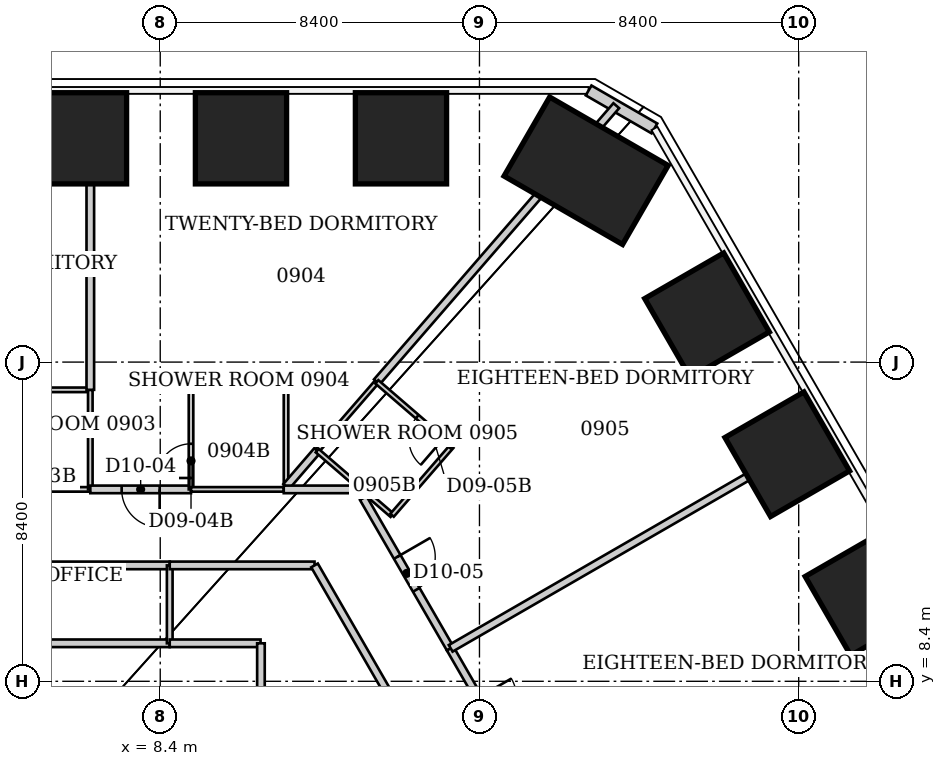
"""IFC4 building model, lengths in metres.
Left out: names, types, materials, properties, quantities, classifications, styles, units other than length and angle.
Written with IfcOpenShell. Run it as: python <this file> out.ifc"""

import sys

from ifc_helpers import new_model, si_unit, direction, frame, frame_2d, origin, origin_2d, place, context, subcontext, project, spatial, rectangle, extrude, element, fill, save


model = new_model("IFC4")
c1 = context("Model", 3, precision=1e-05, world=origin(), true_north=direction((0.0, 1.0)))
c2 = subcontext(c1, "Body", "Model", "MODEL_VIEW")
j1 = project(units=[si_unit("LENGTHUNIT", "METRE"), si_unit("PLANEANGLEUNIT", "RADIAN")], contexts=[c1])
p1 = place(None, origin())
s1 = spatial("IfcSite", under=j1, at=p1, CompositionType="ELEMENT")
p2 = place(p1, origin())
s2 = spatial("IfcBuilding", under=s1, at=p2, CompositionType="ELEMENT")
p3 = place(p2, frame((0.0, 0.0, 42.0)))
s3 = spatial("IfcBuildingStorey", under=s2, at=p3, CompositionType="ELEMENT", Elevation=42.0)
for number, where, z_axis, x_axis in (
    (1, (6.315, 22.689, 0.0), (0.0, 0.0, 1.0), (0.0, 1.0, 0.0)),
    (2, (10.525, 22.689, 0.0), (0.0, 0.0, 1.0), (0.0, 1.0, 0.0)),
    (3, (14.735, 22.689, 0.0), (0.0, 0.0, 1.0), (0.0, 1.0, 0.0)),
):
    element("IfcColumn", number, at=place(p3, frame(where, z_axis=z_axis, x_axis=x_axis)), inside=s3, PredefinedType="COLUMN", context=c2, shape_type="SweptSolid", body=[
        extrude(rectangle(XDim=2.4, YDim=2.4, at=origin_2d()), origin(), (0.0, 0.0, 1.0), 3.8),
    ])
p4 = place(p3, frame((19.606, 21.835, 0.0), z_axis=(0.0, 0.0, 1.0), x_axis=(0.5, 0.866025403784, 0.0)))
e4 = element("IfcColumn", 4, at=p4, inside=s3, PredefinedType="COLUMN", context=c2, shape_type="SweptSolid", body=[
    extrude(rectangle(XDim=2.4, YDim=3.6, at=origin_2d()), origin(), (0.0, 0.0, 1.0), 3.8),
])
for number, where, z_axis, x_axis in (
    (5, (22.788, 18.032, 0.0), (0.0, 0.0, 1.0), (0.866, 0.5, 0.0)),
    (6, (24.899, 14.375, 0.0), (0.0, 0.0, 1.0), (0.866, 0.5, 0.0)),
    (7, (27.01, 10.719, 0.0), (0.0, 0.0, 1.0), (0.866, 0.5, 0.0)),
):
    element("IfcColumn", number, at=place(p3, frame(where, z_axis=z_axis, x_axis=x_axis)), inside=s3, PredefinedType="COLUMN", context=c2, shape_type="SweptSolid", body=[
        extrude(rectangle(XDim=2.4, YDim=2.4, at=origin_2d()), origin(), (0.0, 0.0, 1.0), 3.8),
    ])
p5 = place(p3, frame((19.672, 23.949, 0.0), z_axis=(0.0, 0.0, 1.0), x_axis=(0.866010750942, -0.50002537861, 0.0)))
e8 = element("IfcWall", 8, at=p5, inside=s3, PredefinedType="SOLIDWALL", context=c2, shape_type="SweptSolid", body=[
    extrude(rectangle(XDim=2.0, YDim=0.3, at=frame_2d((1.0, 0.0))), origin(), (0.0, 0.0, 1.0), 3.64),
])
p6 = place(p3, frame((0.0, 11.45, 0.0), z_axis=(0.0, 0.0, 1.0), x_axis=(1.0, 0.0, 0.0)))
e9 = element("IfcWall", 9, at=p6, inside=s3, PredefinedType="PARTITIONING", context=c2, shape_type="SweptSolid", body=[
    extrude(rectangle(XDim=8.65, YDim=0.2, at=frame_2d((4.325, 0.0))), origin(), (0.0, 0.0, 1.0), 3.64),
])
p7 = place(p6, frame((3.775, 0.0, 0.0)))
e10 = element("IfcOpeningElement", 10, at=p7, cuts=e9, PredefinedType="OPENING", context=c2, shape_type="SweptSolid", body=[
    extrude(rectangle(XDim=1.1, YDim=2.2, at=frame_2d((0.55, 1.1))), frame((0.0, 0.1, 0.0), z_axis=(0.0, -1.0, 0.0), x_axis=(1.0, 0.0, 0.0)), (0.0, 0.0, 1.0), 0.2),
])
for number, where, z_axis, x_axis in (
    (11, (6.56, 13.45, 0.0), (0.0, 0.0, 1.0), (-1.0, 0.0, 0.0)),
    (12, (6.56, 16.07, 0.0), (0.0, 0.0, 1.0), (-1.0, 0.0, 0.0)),
):
    element("IfcWall", number, at=place(p3, frame(where, z_axis=z_axis, x_axis=x_axis)), inside=s3, PredefinedType="PARTITIONING", context=c2, shape_type="SweptSolid", body=[
        extrude(rectangle(XDim=2.4, YDim=0.12, at=frame_2d((1.2, 0.0))), origin(), (0.0, 0.0, 1.0), 3.64),
    ])
p8 = place(p3, frame((6.56, 16.07, 0.0), z_axis=(0.0, 0.0, 1.0), x_axis=(0.0, -1.0, 0.0)))
e13 = element("IfcWall", 13, at=p8, inside=s3, PredefinedType="PARTITIONING", context=c2, shape_type="SweptSolid", body=[
    extrude(rectangle(XDim=2.62, YDim=0.12, at=frame_2d((1.31, 0.0))), origin(), (0.0, 0.0, 1.0), 3.64),
])
p9 = place(p3, frame((6.56, 23.83, 0.0), z_axis=(0.0, 0.0, 1.0), x_axis=(0.0, -1.0, 0.0)))
e14 = element("IfcWall", 14, at=p9, inside=s3, PredefinedType="PARTITIONING", context=c2, shape_type="SweptSolid", body=[
    extrude(rectangle(XDim=7.76, YDim=0.2, at=frame_2d((3.88, 0.0))), origin(), (0.0, 0.0, 1.0), 3.64),
])
p10 = place(p3, frame((8.65, 9.4, 0.0), z_axis=(0.0, 0.0, 1.0), x_axis=(-1.0, 0.0, 0.0)))
e15 = element("IfcWall", 15, at=p10, inside=s3, PredefinedType="PARTITIONING", context=c2, shape_type="SweptSolid", body=[
    extrude(rectangle(XDim=8.65, YDim=0.2, at=frame_2d((4.325, 0.0))), origin(), (0.0, 0.0, 1.0), 3.64),
])
p11 = place(p3, frame((8.65, 11.45, 0.0), z_axis=(0.0, 0.0, 1.0), x_axis=(0.0, -1.0, 0.0)))
e16 = element("IfcWall", 16, at=p11, inside=s3, PredefinedType="PARTITIONING", context=c2, shape_type="SweptSolid", body=[
    extrude(rectangle(XDim=2.05, YDim=0.15, at=frame_2d((1.025, 0.0))), origin(), (0.0, 0.0, 1.0), 3.64),
])
p12 = place(p3, frame((8.65, 11.45, 0.0), z_axis=(0.0, 0.0, 1.0), x_axis=(1.0, 0.0, 0.0)))
e17 = element("IfcWall", 17, at=p12, inside=s3, PredefinedType="PARTITIONING", context=c2, shape_type="SweptSolid", body=[
    extrude(rectangle(XDim=3.81, YDim=0.2, at=frame_2d((1.905, 0.0))), origin(), (0.0, 0.0, 1.0), 3.64),
])
p13 = place(p3, frame((9.21, 13.45, 0.0), z_axis=(0.0, 0.0, 1.0), x_axis=(-1.0, 0.0, 0.0)))
e18 = element("IfcWall", 18, at=p13, inside=s3, PredefinedType="PARTITIONING", context=c2, shape_type="SweptSolid", body=[
    extrude(rectangle(XDim=2.65, YDim=0.2, at=frame_2d((1.325, 0.0))), origin(), (0.0, 0.0, 1.0), 3.64),
])
p14 = place(p13, frame((0.825, 0.0, 0.0)))
e19 = element("IfcOpeningElement", 19, at=p14, cuts=e18, PredefinedType="OPENING", context=c2, shape_type="SweptSolid", body=[
    extrude(rectangle(XDim=1.0, YDim=2.13, at=frame_2d((0.5, 1.065))), frame((0.0, 0.1, 0.0), z_axis=(0.0, -1.0, 0.0), x_axis=(1.0, 0.0, 0.0)), (0.0, 0.0, 1.0), 0.2),
])
p15 = place(p3, frame((9.21, 16.12, 0.0), z_axis=(0.0, 0.0, 1.0), x_axis=(0.0, -1.0, 0.0)))
e20 = element("IfcWall", 20, at=p15, inside=s3, PredefinedType="PARTITIONING", context=c2, shape_type="SweptSolid", body=[
    extrude(rectangle(XDim=2.67, YDim=0.12, at=frame_2d((1.335, 0.0))), origin(), (0.0, 0.0, 1.0), 3.64),
])
p16 = place(p15, frame((1.47, 0.0, 0.0)))
e21 = element("IfcOpeningElement", 21, at=p16, cuts=e20, PredefinedType="OPENING", context=c2, shape_type="SweptSolid", body=[
    extrude(rectangle(XDim=0.9, YDim=2.03, at=frame_2d((0.45, 1.015))), frame((0.0, 0.06, 0.0), z_axis=(0.0, -1.0, 0.0), x_axis=(1.0, 0.0, 0.0)), (0.0, 0.0, 1.0), 0.12),
])
p17 = place(p3, frame((11.04, 9.4, 0.0), z_axis=(0.0, 0.0, 1.0), x_axis=(-1.0, 0.0, 0.0)))
e22 = element("IfcWall", 22, at=p17, inside=s3, PredefinedType="PARTITIONING", context=c2, shape_type="SweptSolid", body=[
    extrude(rectangle(XDim=2.39, YDim=0.2, at=frame_2d((1.195, 0.0))), origin(), (0.0, 0.0, 1.0), 3.64),
])
p18 = place(p3, frame((11.05, -7.76, 0.0), z_axis=(0.0, 0.0, 1.0), x_axis=(0.0, 1.0, 0.0)))
e23 = element("IfcWall", 23, at=p18, inside=s3, PredefinedType="PARTITIONING", context=c2, shape_type="SweptSolid", body=[
    extrude(rectangle(XDim=17.16, YDim=0.2, at=frame_2d((8.58, 0.0))), origin(), (0.0, 0.0, 1.0), 3.64),
])
p19 = place(p18, frame((8.03, 0.0, 0.0)))
e24 = element("IfcOpeningElement", 24, at=p19, cuts=e23, PredefinedType="OPENING", context=c2, shape_type="SweptSolid", body=[
    extrude(rectangle(XDim=1.1, YDim=2.2, at=frame_2d((0.55, 1.1))), frame((0.0, 0.1, 0.0), z_axis=(0.0, -1.0, 0.0), x_axis=(1.0, 0.0, 0.0)), (0.0, 0.0, 1.0), 0.2),
])
p20 = place(p3, frame((11.65, 13.45, 0.0), z_axis=(0.0, 0.0, 1.0), x_axis=(-1.0, 0.0, 0.0)))
e25 = element("IfcWall", 25, at=p20, inside=s3, PredefinedType="PARTITIONING", context=c2, shape_type="SweptSolid", body=[
    extrude(rectangle(XDim=2.44, YDim=0.12, at=frame_2d((1.22, 0.0))), origin(), (0.0, 0.0, 1.0), 3.64),
])
p21 = place(p3, frame((11.71, 13.605, 0.0), z_axis=(0.0, 0.0, 1.0), x_axis=(0.0, 1.0, 0.0)))
e26 = element("IfcWall", 26, at=p21, inside=s3, PredefinedType="PARTITIONING", context=c2, shape_type="SweptSolid", body=[
    extrude(rectangle(XDim=2.515, YDim=0.12, at=frame_2d((1.258, 0.0))), origin(), (0.0, 0.0, 1.0), 3.64),
])
p22 = place(p3, frame((11.71, 16.12, 0.0), z_axis=(0.0, 0.0, 1.0), x_axis=(-1.0, 0.0, 0.0)))
e27 = element("IfcWall", 27, at=p22, inside=s3, PredefinedType="PARTITIONING", context=c2, shape_type="SweptSolid", body=[
    extrude(rectangle(XDim=2.5, YDim=0.12, at=frame_2d((1.25, 0.0))), origin(), (0.0, 0.0, 1.0), 3.64),
])
p23 = place(p3, frame((11.715, 13.526, 0.0), z_axis=(0.0, 0.0, 1.0), x_axis=(0.653334457224, 0.757069406993, 0.0)))
e28 = element("IfcWall", 28, at=p23, inside=s3, PredefinedType="PARTITIONING", context=c2, shape_type="SweptSolid", body=[
    extrude(rectangle(XDim=1.247, YDim=0.2, at=frame_2d((0.624, 0.0))), origin(), (0.0, 0.0, 1.0), 3.64),
])
p24 = place(p3, frame((12.46, 11.45, 0.0), z_axis=(0.0, 0.0, 1.0), x_axis=(0.499704269421, -0.866196076603, 0.0)))
e29 = element("IfcWall", 29, at=p24, inside=s3, PredefinedType="PARTITIONING", context=c2, shape_type="SweptSolid", body=[
    extrude(rectangle(XDim=9.686, YDim=0.2, at=frame_2d((4.843, 0.0))), origin(), (0.0, 0.0, 1.0), 3.64),
])
p25 = place(p3, frame((12.53, 14.47, 0.0), z_axis=(0.0, 0.0, 1.0), x_axis=(0.655194291402, 0.755460416245, 0.0)))
e30 = element("IfcWall", 30, at=p25, inside=s3, PredefinedType="PARTITIONING", context=c2, shape_type="SweptSolid", body=[
    extrude(rectangle(XDim=2.396, YDim=0.12, at=frame_2d((1.198, 0.0))), origin(), (0.0, 0.0, 1.0), 3.64),
])
p26 = place(p3, frame((12.53, 14.47, 0.0), z_axis=(0.0, 0.0, 1.0), x_axis=(0.757086659925, -0.653314464377, 0.0)))
e31 = element("IfcWall", 31, at=p26, inside=s3, PredefinedType="PARTITIONING", context=c2, shape_type="SweptSolid", body=[
    extrude(rectangle(XDim=2.602, YDim=0.12, at=frame_2d((1.301, 0.0))), origin(), (0.0, 0.0, 1.0), 3.64),
])
p27 = place(p3, frame((13.505, 13.45, 0.0), z_axis=(0.0, 0.0, 1.0), x_axis=(-1.0, 0.0, 0.0)))
e32 = element("IfcWall", 32, at=p27, inside=s3, PredefinedType="PARTITIONING", context=c2, shape_type="SweptSolid", body=[
    extrude(rectangle(XDim=1.855, YDim=0.2, at=frame_2d((0.927, 0.0))), origin(), (0.0, 0.0, 1.0), 3.64),
])
p28 = place(p3, frame((13.742, 13.22, 0.0), z_axis=(0.0, 0.0, 1.0), x_axis=(0.500169095125, -0.865927754655, 0.0)))
e33 = element("IfcWall", 33, at=p28, inside=s3, PredefinedType="PARTITIONING", context=c2, shape_type="SweptSolid", body=[
    extrude(rectangle(XDim=4.574, YDim=0.2, at=frame_2d((2.287, 0.0))), origin(), (0.0, 0.0, 1.0), 3.64),
])
p29 = place(p28, frame((1.787, 0.0, 0.0)))
e34 = element("IfcOpeningElement", 34, at=p29, cuts=e33, PredefinedType="OPENING", context=c2, shape_type="SweptSolid", body=[
    extrude(rectangle(XDim=1.0, YDim=2.13, at=frame_2d((0.5, 1.065))), frame((0.0, 0.1, 0.0), z_axis=(0.0, -1.0, 0.0), x_axis=(1.0, 0.0, 0.0)), (0.0, 0.0, 1.0), 0.2),
])
p30 = place(p3, frame((14.1, 16.28, 0.0), z_axis=(0.0, 0.0, 1.0), x_axis=(0.655045529498, 0.755589408531, 0.0)))
e35 = element("IfcWall", 35, at=p30, inside=s3, PredefinedType="PARTITIONING", context=c2, shape_type="SweptSolid", body=[
    extrude(rectangle(XDim=9.618, YDim=0.2, at=frame_2d((4.809, 0.0))), origin(), (0.0, 0.0, 1.0), 3.64),
])
p31 = place(p3, frame((14.5, 12.77, 0.0), z_axis=(0.0, 0.0, 1.0), x_axis=(0.655252439976, 0.755409981338, 0.0)))
e36 = element("IfcWall", 36, at=p31, inside=s3, PredefinedType="PARTITIONING", context=c2, shape_type="SweptSolid", body=[
    extrude(rectangle(XDim=2.396, YDim=0.12, at=frame_2d((1.198, 0.0))), origin(), (0.0, 0.0, 1.0), 3.64),
])
p32 = place(p3, frame((16.03, 9.26, 0.0), z_axis=(0.0, 0.0, 1.0), x_axis=(0.500123041693, -0.865954353975, 0.0)))
e37 = element("IfcWall", 37, at=p32, inside=s3, PredefinedType="PARTITIONING", context=c2, shape_type="SweptSolid", body=[
    extrude(rectangle(XDim=3.974, YDim=0.2, at=frame_2d((1.987, 0.0))), origin(), (0.0, 0.0, 1.0), 3.64),
])
p33 = place(p32, frame((1.487, 0.0, 0.0)))
e38 = element("IfcOpeningElement", 38, at=p33, cuts=e37, PredefinedType="OPENING", context=c2, shape_type="SweptSolid", body=[
    extrude(rectangle(XDim=1.0, YDim=2.13, at=frame_2d((0.5, 1.065))), frame((0.0, 0.1, 0.0), z_axis=(0.0, -1.0, 0.0), x_axis=(1.0, 0.0, 0.0)), (0.0, 0.0, 1.0), 0.2),
])
p34 = place(p3, frame((16.07, 14.58, 0.0), z_axis=(0.0, 0.0, 1.0), x_axis=(-0.757086659925, 0.653314464377, 0.0)))
e39 = element("IfcWall", 39, at=p34, inside=s3, PredefinedType="PARTITIONING", context=c2, shape_type="SweptSolid", body=[
    extrude(rectangle(XDim=2.602, YDim=0.12, at=frame_2d((1.301, 0.0))), origin(), (0.0, 0.0, 1.0), 3.64),
])
p35 = place(p34, frame((0.3, 0.0, 0.0)))
e40 = element("IfcOpeningElement", 40, at=p35, cuts=e39, PredefinedType="OPENING", context=c2, shape_type="SweptSolid", body=[
    extrude(rectangle(XDim=0.9, YDim=2.03, at=frame_2d((0.45, 1.015))), frame((0.0, 0.06, 0.0), z_axis=(0.0, -1.0, 0.0), x_axis=(1.0, 0.0, 0.0)), (0.0, 0.0, 1.0), 0.12),
])
p36 = place(p3, frame((25.886, 14.95, 0.0), z_axis=(0.0, 0.0, 1.0), x_axis=(-0.86604429266, -0.499967282081, 0.0)))
e41 = element("IfcWall", 41, at=p36, inside=s3, PredefinedType="PARTITIONING", context=c2, shape_type="SweptSolid", body=[
    extrude(rectangle(XDim=11.365, YDim=0.2, at=frame_2d((5.683, 0.0))), origin(), (0.0, 0.0, 1.0), 2.86),
])
p37 = place(p14, origin())
e42 = element("IfcDoor", 42, at=p37, inside=s3, OperationType="SINGLE_SWING_LEFT", PredefinedType="DOOR", context=c2, shape_type="SweptSolid", body=[
    extrude(rectangle(XDim=1.0, YDim=2.13, at=frame_2d((0.5, 1.065))), frame((0.0, 0.025, 0.0), z_axis=(0.0, -1.0, 0.0), x_axis=(1.0, 0.0, 0.0)), (0.0, 0.0, 1.0), 0.05),
])
fill(e19, e42)
p38 = place(p16, origin())
e43 = element("IfcDoor", 43, at=p38, inside=s3, OperationType="SINGLE_SWING_RIGHT", PredefinedType="DOOR", context=c2, shape_type="SweptSolid", body=[
    extrude(rectangle(XDim=0.9, YDim=2.03, at=frame_2d((0.45, 1.015))), frame((0.0, 0.025, 0.0), z_axis=(0.0, -1.0, 0.0), x_axis=(1.0, 0.0, 0.0)), (0.0, 0.0, 1.0), 0.05),
])
fill(e21, e43)
p39 = place(p29, origin())
e44 = element("IfcDoor", 44, at=p39, inside=s3, OperationType="SINGLE_SWING_LEFT", PredefinedType="DOOR", context=c2, shape_type="SweptSolid", body=[
    extrude(rectangle(XDim=1.0, YDim=2.13, at=frame_2d((0.5, 1.065))), frame((0.0, 0.025, 0.0), z_axis=(0.0, -1.0, 0.0), x_axis=(1.0, 0.0, 0.0)), (0.0, 0.0, 1.0), 0.05),
])
fill(e34, e44)
p40 = place(p35, origin())
e45 = element("IfcDoor", 45, at=p40, inside=s3, OperationType="SINGLE_SWING_LEFT", PredefinedType="DOOR", context=c2, shape_type="SweptSolid", body=[
    extrude(rectangle(XDim=0.9, YDim=2.03, at=frame_2d((0.45, 1.015))), frame((0.0, 0.025, 0.0), z_axis=(0.0, -1.0, 0.0), x_axis=(1.0, 0.0, 0.0)), (0.0, 0.0, 1.0), 0.05),
])
fill(e40, e45)
save(model, sys.argv[1])
